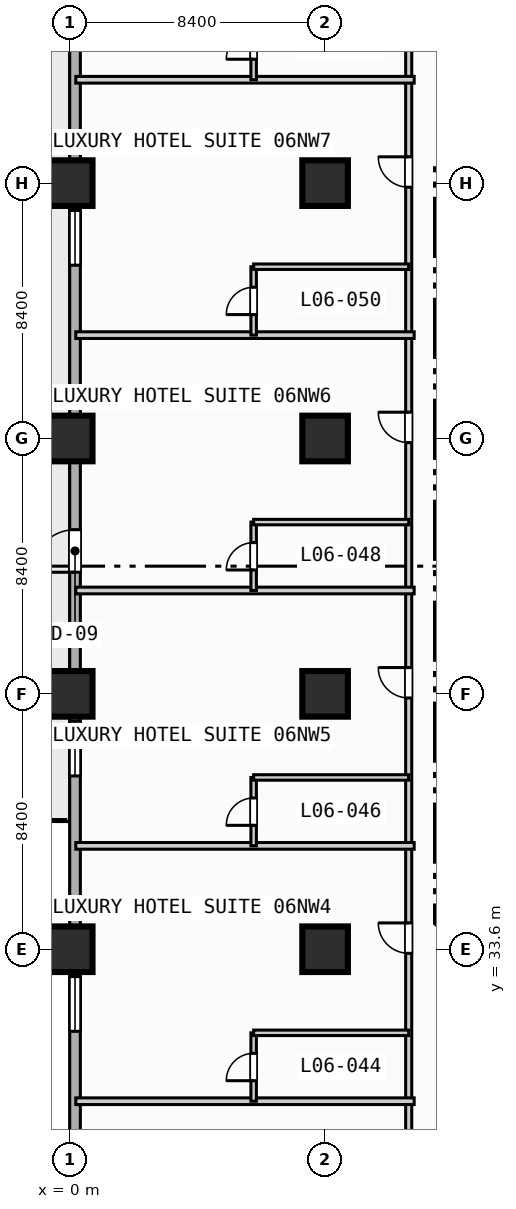
"""IFC4 building model, lengths in metres.
Left out: names, types, materials, properties, quantities, classifications, styles, units other than length and angle.
Written with IfcOpenShell. Run it as: python <this file> out.ifc"""

import sys

from ifc_helpers import new_model, si_unit, direction, frame, frame_2d, origin, origin_2d, place, context, subcontext, project, spatial, rectangle, extrude, element, fill, save


model = new_model("IFC4")
c1 = context("Model", 3, precision=1e-05, world=origin(), true_north=direction((0.0, 1.0)))
c2 = subcontext(c1, "Body", "Model", "MODEL_VIEW")
j1 = project(units=[si_unit("LENGTHUNIT", "METRE"), si_unit("PLANEANGLEUNIT", "RADIAN")], contexts=[c1])
p1 = place(None, origin())
s1 = spatial("IfcSite", under=j1, at=p1, CompositionType="ELEMENT")
p2 = place(p1, origin())
s2 = spatial("IfcBuilding", under=s1, at=p2, CompositionType="ELEMENT")
p3 = place(p2, frame((0.0, 0.0, 32.0)))
s3 = spatial("IfcBuildingStorey", under=s2, at=p3, CompositionType="ELEMENT", Elevation=32.0)
for number, where, z_axis, x_axis in (
    (1, (0.0, 33.6, 0.0), (0.0, 0.0, 1.0), (1.0, 0.0, 0.0)),
    (2, (0.0, 42.0, 0.0), (0.0, 0.0, 1.0), (1.0, 0.0, 0.0)),
    (3, (0.0, 50.4, 0.0), (0.0, 0.0, 1.0), (1.0, 0.0, 0.0)),
    (4, (0.0, 58.8, 0.0), (0.0, 0.0, 1.0), (1.0, 0.0, 0.0)),
    (5, (8.4, 33.6, 0.0), (0.0, 0.0, 1.0), (1.0, 0.0, 0.0)),
    (6, (8.4, 42.0, 0.0), (0.0, 0.0, 1.0), (1.0, 0.0, 0.0)),
    (7, (8.4, 50.4, 0.0), (0.0, 0.0, 1.0), (1.0, 0.0, 0.0)),
    (8, (8.4, 58.8, 0.0), (0.0, 0.0, 1.0), (1.0, 0.0, 0.0)),
):
    element("IfcColumn", number, at=place(p3, frame(where, z_axis=z_axis, x_axis=x_axis)), inside=s3, PredefinedType="COLUMN", context=c2, shape_type="SweptSolid", body=[
        extrude(rectangle(XDim=1.5, YDim=1.5, at=origin_2d()), origin(), (0.0, 0.0, 1.0), 3.8),
    ])
p4 = place(p3, frame((0.175, 3.175, 0.0), z_axis=(0.0, 0.0, 1.0), x_axis=(0.0, 1.0, 0.0)))
e9 = element("IfcWall", 9, at=p4, inside=s3, PredefinedType="STANDARD", context=c2, shape_type="SweptSolid", body=[
    extrude(rectangle(XDim=86.05, YDim=0.35, at=frame_2d((43.025, 0.0))), origin(), (0.0, 0.0, 1.0), 3.55),
])
p5 = place(p4, frame((42.825, 0.0, 0.0)))
e10 = element("IfcOpeningElement", 10, at=p5, cuts=e9, PredefinedType="OPENING", context=c2, shape_type="SweptSolid", body=[
    extrude(rectangle(XDim=1.4, YDim=2.2, at=frame_2d((0.7, 1.1))), frame((0.0, 0.185, 0.0), z_axis=(0.0, -1.0, 0.0), x_axis=(1.0, 0.0, 0.0)), (0.0, 0.0, 1.0), 0.37),
])
p6 = place(p4, frame((2.525, 0.0, 0.85)))
e11 = element("IfcOpeningElement", 11, at=p6, cuts=e9, PredefinedType="OPENING", context=c2, shape_type="SweptSolid", body=[
    extrude(rectangle(XDim=1.8, YDim=1.8, at=frame_2d((0.9, 0.9))), frame((0.0, 0.185, 0.0), z_axis=(0.0, -1.0, 0.0), x_axis=(1.0, 0.0, 0.0)), (0.0, 0.0, 1.0), 0.37),
])
p7 = place(p4, frame((10.925, 0.0, 0.85)))
e12 = element("IfcOpeningElement", 12, at=p7, cuts=e9, PredefinedType="OPENING", context=c2, shape_type="SweptSolid", body=[
    extrude(rectangle(XDim=1.8, YDim=1.8, at=frame_2d((0.9, 0.9))), frame((0.0, 0.185, 0.0), z_axis=(0.0, -1.0, 0.0), x_axis=(1.0, 0.0, 0.0)), (0.0, 0.0, 1.0), 0.37),
])
p8 = place(p4, frame((19.325, 0.0, 0.85)))
e13 = element("IfcOpeningElement", 13, at=p8, cuts=e9, PredefinedType="OPENING", context=c2, shape_type="SweptSolid", body=[
    extrude(rectangle(XDim=1.8, YDim=1.8, at=frame_2d((0.9, 0.9))), frame((0.0, 0.185, 0.0), z_axis=(0.0, -1.0, 0.0), x_axis=(1.0, 0.0, 0.0)), (0.0, 0.0, 1.0), 0.37),
])
p9 = place(p4, frame((27.725, 0.0, 0.85)))
e14 = element("IfcOpeningElement", 14, at=p9, cuts=e9, PredefinedType="OPENING", context=c2, shape_type="SweptSolid", body=[
    extrude(rectangle(XDim=1.8, YDim=1.8, at=frame_2d((0.9, 0.9))), frame((0.0, 0.185, 0.0), z_axis=(0.0, -1.0, 0.0), x_axis=(1.0, 0.0, 0.0)), (0.0, 0.0, 1.0), 0.37),
])
p10 = place(p4, frame((36.125, 0.0, 0.85)))
e15 = element("IfcOpeningElement", 15, at=p10, cuts=e9, PredefinedType="OPENING", context=c2, shape_type="SweptSolid", body=[
    extrude(rectangle(XDim=1.8, YDim=1.8, at=frame_2d((0.9, 0.9))), frame((0.0, 0.185, 0.0), z_axis=(0.0, -1.0, 0.0), x_axis=(1.0, 0.0, 0.0)), (0.0, 0.0, 1.0), 0.37),
])
p11 = place(p4, frame((52.925, 0.0, 0.85)))
e16 = element("IfcOpeningElement", 16, at=p11, cuts=e9, PredefinedType="OPENING", context=c2, shape_type="SweptSolid", body=[
    extrude(rectangle(XDim=1.8, YDim=1.8, at=frame_2d((0.9, 0.9))), frame((0.0, 0.185, 0.0), z_axis=(0.0, -1.0, 0.0), x_axis=(1.0, 0.0, 0.0)), (0.0, 0.0, 1.0), 0.37),
])
p12 = place(p4, frame((61.325, 0.0, 0.85)))
e17 = element("IfcOpeningElement", 17, at=p12, cuts=e9, PredefinedType="OPENING", context=c2, shape_type="SweptSolid", body=[
    extrude(rectangle(XDim=1.8, YDim=1.8, at=frame_2d((0.9, 0.9))), frame((0.0, 0.185, 0.0), z_axis=(0.0, -1.0, 0.0), x_axis=(1.0, 0.0, 0.0)), (0.0, 0.0, 1.0), 0.37),
])
p13 = place(p4, frame((69.725, 0.0, 0.85)))
e18 = element("IfcOpeningElement", 18, at=p13, cuts=e9, PredefinedType="OPENING", context=c2, shape_type="SweptSolid", body=[
    extrude(rectangle(XDim=1.8, YDim=1.8, at=frame_2d((0.9, 0.9))), frame((0.0, 0.185, 0.0), z_axis=(0.0, -1.0, 0.0), x_axis=(1.0, 0.0, 0.0)), (0.0, 0.0, 1.0), 0.37),
])
p14 = place(p4, frame((78.075, 0.0, 0.85)))
e19 = element("IfcOpeningElement", 19, at=p14, cuts=e9, PredefinedType="OPENING", context=c2, shape_type="SweptSolid", body=[
    extrude(rectangle(XDim=1.8, YDim=1.8, at=frame_2d((0.9, 0.9))), frame((0.0, 0.185, 0.0), z_axis=(0.0, -1.0, 0.0), x_axis=(1.0, 0.0, 0.0)), (0.0, 0.0, 1.0), 0.37),
])
p15 = place(p3, frame((11.15, 3.4, 0.0), z_axis=(0.0, 0.0, 1.0), x_axis=(0.0, 1.0, 0.0)))
e20 = element("IfcWall", 20, at=p15, inside=s3, PredefinedType="PARTITIONING", context=c2, shape_type="SweptSolid", body=[
    extrude(rectangle(XDim=85.4, YDim=0.2, at=frame_2d((42.7, 0.0))), origin(), (0.0, 0.0, 1.0), 3.55),
])
p16 = place(p15, frame((4.865, 0.0, 0.0)))
e21 = element("IfcOpeningElement", 21, at=p16, cuts=e20, PredefinedType="OPENING", context=c2, shape_type="SweptSolid", body=[
    extrude(rectangle(XDim=1.0, YDim=2.15, at=frame_2d((0.5, 1.075))), frame((0.0, 0.11, 0.0), z_axis=(0.0, -1.0, 0.0), x_axis=(1.0, 0.0, 0.0)), (0.0, 0.0, 1.0), 0.22),
])
p17 = place(p15, frame((13.265, 0.0, 0.0)))
e22 = element("IfcOpeningElement", 22, at=p17, cuts=e20, PredefinedType="OPENING", context=c2, shape_type="SweptSolid", body=[
    extrude(rectangle(XDim=1.0, YDim=2.15, at=frame_2d((0.5, 1.075))), frame((0.0, 0.11, 0.0), z_axis=(0.0, -1.0, 0.0), x_axis=(1.0, 0.0, 0.0)), (0.0, 0.0, 1.0), 0.22),
])
p18 = place(p15, frame((21.665, 0.0, 0.0)))
e23 = element("IfcOpeningElement", 23, at=p18, cuts=e20, PredefinedType="OPENING", context=c2, shape_type="SweptSolid", body=[
    extrude(rectangle(XDim=1.0, YDim=2.15, at=frame_2d((0.5, 1.075))), frame((0.0, 0.11, 0.0), z_axis=(0.0, -1.0, 0.0), x_axis=(1.0, 0.0, 0.0)), (0.0, 0.0, 1.0), 0.22),
])
p19 = place(p15, frame((30.065, 0.0, 0.0)))
e24 = element("IfcOpeningElement", 24, at=p19, cuts=e20, PredefinedType="OPENING", context=c2, shape_type="SweptSolid", body=[
    extrude(rectangle(XDim=1.0, YDim=2.15, at=frame_2d((0.5, 1.075))), frame((0.0, 0.11, 0.0), z_axis=(0.0, -1.0, 0.0), x_axis=(1.0, 0.0, 0.0)), (0.0, 0.0, 1.0), 0.22),
])
p20 = place(p15, frame((38.465, 0.0, 0.0)))
e25 = element("IfcOpeningElement", 25, at=p20, cuts=e20, PredefinedType="OPENING", context=c2, shape_type="SweptSolid", body=[
    extrude(rectangle(XDim=1.0, YDim=2.15, at=frame_2d((0.5, 1.075))), frame((0.0, 0.11, 0.0), z_axis=(0.0, -1.0, 0.0), x_axis=(1.0, 0.0, 0.0)), (0.0, 0.0, 1.0), 0.22),
])
p21 = place(p15, frame((46.865, 0.0, 0.0)))
e26 = element("IfcOpeningElement", 26, at=p21, cuts=e20, PredefinedType="OPENING", context=c2, shape_type="SweptSolid", body=[
    extrude(rectangle(XDim=1.0, YDim=2.15, at=frame_2d((0.5, 1.075))), frame((0.0, 0.11, 0.0), z_axis=(0.0, -1.0, 0.0), x_axis=(1.0, 0.0, 0.0)), (0.0, 0.0, 1.0), 0.22),
])
p22 = place(p15, frame((55.265, 0.0, 0.0)))
e27 = element("IfcOpeningElement", 27, at=p22, cuts=e20, PredefinedType="OPENING", context=c2, shape_type="SweptSolid", body=[
    extrude(rectangle(XDim=1.0, YDim=2.15, at=frame_2d((0.5, 1.075))), frame((0.0, 0.11, 0.0), z_axis=(0.0, -1.0, 0.0), x_axis=(1.0, 0.0, 0.0)), (0.0, 0.0, 1.0), 0.22),
])
p23 = place(p15, frame((63.665, 0.0, 0.0)))
e28 = element("IfcOpeningElement", 28, at=p23, cuts=e20, PredefinedType="OPENING", context=c2, shape_type="SweptSolid", body=[
    extrude(rectangle(XDim=1.0, YDim=2.15, at=frame_2d((0.5, 1.075))), frame((0.0, 0.11, 0.0), z_axis=(0.0, -1.0, 0.0), x_axis=(1.0, 0.0, 0.0)), (0.0, 0.0, 1.0), 0.22),
])
p24 = place(p15, frame((72.065, 0.0, 0.0)))
e29 = element("IfcOpeningElement", 29, at=p24, cuts=e20, PredefinedType="OPENING", context=c2, shape_type="SweptSolid", body=[
    extrude(rectangle(XDim=1.0, YDim=2.15, at=frame_2d((0.5, 1.075))), frame((0.0, 0.11, 0.0), z_axis=(0.0, -1.0, 0.0), x_axis=(1.0, 0.0, 0.0)), (0.0, 0.0, 1.0), 0.22),
])
p25 = place(p15, frame((81.165, 0.0, 0.0)))
e30 = element("IfcOpeningElement", 30, at=p25, cuts=e20, PredefinedType="OPENING", context=c2, shape_type="SweptSolid", body=[
    extrude(rectangle(XDim=1.0, YDim=2.15, at=frame_2d((0.5, 1.075))), frame((0.0, 0.11, 0.0), z_axis=(0.0, -1.0, 0.0), x_axis=(1.0, 0.0, 0.0)), (0.0, 0.0, 1.0), 0.22),
])
p26 = place(p3, frame((0.2, 28.6, 0.0), z_axis=(0.0, 0.0, 1.0), x_axis=(1.0, 0.0, 0.0)))
e31 = element("IfcWall", 31, at=p26, inside=s3, PredefinedType="PARTITIONING", context=c2, shape_type="SweptSolid", body=[
    extrude(rectangle(XDim=11.13, YDim=0.22, at=frame_2d((5.565, 0.0))), origin(), (0.0, 0.0, 1.0), 3.55),
])
p27 = place(p3, frame((6.05, 28.6, 0.0), z_axis=(0.0, 0.0, 1.0), x_axis=(0.0, 1.0, 0.0)))
e32 = element("IfcWall", 32, at=p27, inside=s3, PredefinedType="PLUMBINGWALL", context=c2, shape_type="SweptSolid", body=[
    extrude(rectangle(XDim=2.25, YDim=0.18, at=frame_2d((1.125, 0.0))), origin(), (0.0, 0.0, 1.0), 3.55),
])
p28 = place(p27, frame((0.675, 0.0, 0.0)))
e33 = element("IfcOpeningElement", 33, at=p28, cuts=e32, PredefinedType="OPENING", context=c2, shape_type="SweptSolid", body=[
    extrude(rectangle(XDim=0.9, YDim=2.1, at=frame_2d((0.45, 1.05))), frame((0.0, 0.1, 0.0), z_axis=(0.0, -1.0, 0.0), x_axis=(1.0, 0.0, 0.0)), (0.0, 0.0, 1.0), 0.2),
])
p29 = place(p3, frame((6.05, 30.85, 0.0), z_axis=(0.0, 0.0, 1.0), x_axis=(1.0, 0.0, 0.0)))
e34 = element("IfcWall", 34, at=p29, inside=s3, PredefinedType="PLUMBINGWALL", context=c2, shape_type="SweptSolid", body=[
    extrude(rectangle(XDim=5.1, YDim=0.18, at=frame_2d((2.55, 0.0))), origin(), (0.0, 0.0, 1.0), 3.55),
])
p30 = place(p3, frame((0.2, 37.0, 0.0), z_axis=(0.0, 0.0, 1.0), x_axis=(1.0, 0.0, 0.0)))
e35 = element("IfcWall", 35, at=p30, inside=s3, PredefinedType="PARTITIONING", context=c2, shape_type="SweptSolid", body=[
    extrude(rectangle(XDim=11.13, YDim=0.22, at=frame_2d((5.565, 0.0))), origin(), (0.0, 0.0, 1.0), 3.55),
])
p31 = place(p3, frame((6.05, 37.0, 0.0), z_axis=(0.0, 0.0, 1.0), x_axis=(0.0, 1.0, 0.0)))
e36 = element("IfcWall", 36, at=p31, inside=s3, PredefinedType="PLUMBINGWALL", context=c2, shape_type="SweptSolid", body=[
    extrude(rectangle(XDim=2.25, YDim=0.18, at=frame_2d((1.125, 0.0))), origin(), (0.0, 0.0, 1.0), 3.55),
])
p32 = place(p31, frame((0.675, 0.0, 0.0)))
e37 = element("IfcOpeningElement", 37, at=p32, cuts=e36, PredefinedType="OPENING", context=c2, shape_type="SweptSolid", body=[
    extrude(rectangle(XDim=0.9, YDim=2.1, at=frame_2d((0.45, 1.05))), frame((0.0, 0.1, 0.0), z_axis=(0.0, -1.0, 0.0), x_axis=(1.0, 0.0, 0.0)), (0.0, 0.0, 1.0), 0.2),
])
p33 = place(p3, frame((6.05, 39.25, 0.0), z_axis=(0.0, 0.0, 1.0), x_axis=(1.0, 0.0, 0.0)))
e38 = element("IfcWall", 38, at=p33, inside=s3, PredefinedType="PLUMBINGWALL", context=c2, shape_type="SweptSolid", body=[
    extrude(rectangle(XDim=5.1, YDim=0.18, at=frame_2d((2.55, 0.0))), origin(), (0.0, 0.0, 1.0), 3.55),
])
p34 = place(p3, frame((0.2, 45.4, 0.0), z_axis=(0.0, 0.0, 1.0), x_axis=(1.0, 0.0, 0.0)))
e39 = element("IfcWall", 39, at=p34, inside=s3, PredefinedType="PARTITIONING", context=c2, shape_type="SweptSolid", body=[
    extrude(rectangle(XDim=11.13, YDim=0.22, at=frame_2d((5.565, 0.0))), origin(), (0.0, 0.0, 1.0), 3.55),
])
p35 = place(p3, frame((6.05, 45.4, 0.0), z_axis=(0.0, 0.0, 1.0), x_axis=(0.0, 1.0, 0.0)))
e40 = element("IfcWall", 40, at=p35, inside=s3, PredefinedType="PLUMBINGWALL", context=c2, shape_type="SweptSolid", body=[
    extrude(rectangle(XDim=2.25, YDim=0.18, at=frame_2d((1.125, 0.0))), origin(), (0.0, 0.0, 1.0), 3.55),
])
p36 = place(p35, frame((0.675, 0.0, 0.0)))
e41 = element("IfcOpeningElement", 41, at=p36, cuts=e40, PredefinedType="OPENING", context=c2, shape_type="SweptSolid", body=[
    extrude(rectangle(XDim=0.9, YDim=2.1, at=frame_2d((0.45, 1.05))), frame((0.0, 0.1, 0.0), z_axis=(0.0, -1.0, 0.0), x_axis=(1.0, 0.0, 0.0)), (0.0, 0.0, 1.0), 0.2),
])
p37 = place(p3, frame((6.05, 47.65, 0.0), z_axis=(0.0, 0.0, 1.0), x_axis=(1.0, 0.0, 0.0)))
e42 = element("IfcWall", 42, at=p37, inside=s3, PredefinedType="PLUMBINGWALL", context=c2, shape_type="SweptSolid", body=[
    extrude(rectangle(XDim=5.1, YDim=0.18, at=frame_2d((2.55, 0.0))), origin(), (0.0, 0.0, 1.0), 3.55),
])
p38 = place(p3, frame((0.2, 53.8, 0.0), z_axis=(0.0, 0.0, 1.0), x_axis=(1.0, 0.0, 0.0)))
e43 = element("IfcWall", 43, at=p38, inside=s3, PredefinedType="PARTITIONING", context=c2, shape_type="SweptSolid", body=[
    extrude(rectangle(XDim=11.13, YDim=0.22, at=frame_2d((5.565, 0.0))), origin(), (0.0, 0.0, 1.0), 3.55),
])
p39 = place(p3, frame((6.05, 53.8, 0.0), z_axis=(0.0, 0.0, 1.0), x_axis=(0.0, 1.0, 0.0)))
e44 = element("IfcWall", 44, at=p39, inside=s3, PredefinedType="PLUMBINGWALL", context=c2, shape_type="SweptSolid", body=[
    extrude(rectangle(XDim=2.25, YDim=0.18, at=frame_2d((1.125, 0.0))), origin(), (0.0, 0.0, 1.0), 3.55),
])
p40 = place(p39, frame((0.675, 0.0, 0.0)))
e45 = element("IfcOpeningElement", 45, at=p40, cuts=e44, PredefinedType="OPENING", context=c2, shape_type="SweptSolid", body=[
    extrude(rectangle(XDim=0.9, YDim=2.1, at=frame_2d((0.45, 1.05))), frame((0.0, 0.1, 0.0), z_axis=(0.0, -1.0, 0.0), x_axis=(1.0, 0.0, 0.0)), (0.0, 0.0, 1.0), 0.2),
])
p41 = place(p3, frame((6.05, 56.05, 0.0), z_axis=(0.0, 0.0, 1.0), x_axis=(1.0, 0.0, 0.0)))
e46 = element("IfcWall", 46, at=p41, inside=s3, PredefinedType="PLUMBINGWALL", context=c2, shape_type="SweptSolid", body=[
    extrude(rectangle(XDim=5.1, YDim=0.18, at=frame_2d((2.55, 0.0))), origin(), (0.0, 0.0, 1.0), 3.55),
])
p42 = place(p3, frame((0.2, 62.2, 0.0), z_axis=(0.0, 0.0, 1.0), x_axis=(1.0, 0.0, 0.0)))
e47 = element("IfcWall", 47, at=p42, inside=s3, PredefinedType="PARTITIONING", context=c2, shape_type="SweptSolid", body=[
    extrude(rectangle(XDim=11.13, YDim=0.22, at=frame_2d((5.565, 0.0))), origin(), (0.0, 0.0, 1.0), 3.55),
])
p43 = place(p3, frame((6.05, 62.2, 0.0), z_axis=(0.0, 0.0, 1.0), x_axis=(0.0, 1.0, 0.0)))
e48 = element("IfcWall", 48, at=p43, inside=s3, PredefinedType="PLUMBINGWALL", context=c2, shape_type="SweptSolid", body=[
    extrude(rectangle(XDim=2.25, YDim=0.18, at=frame_2d((1.125, 0.0))), origin(), (0.0, 0.0, 1.0), 3.55),
])
p44 = place(p43, frame((0.675, 0.0, 0.0)))
e49 = element("IfcOpeningElement", 49, at=p44, cuts=e48, PredefinedType="OPENING", context=c2, shape_type="SweptSolid", body=[
    extrude(rectangle(XDim=0.9, YDim=2.1, at=frame_2d((0.45, 1.05))), frame((0.0, 0.1, 0.0), z_axis=(0.0, -1.0, 0.0), x_axis=(1.0, 0.0, 0.0)), (0.0, 0.0, 1.0), 0.2),
])
p45 = place(p5, origin())
e50 = element("IfcDoor", 50, at=p45, inside=s3, OperationType="SINGLE_SWING_LEFT", PredefinedType="DOOR", context=c2, shape_type="SweptSolid", body=[
    extrude(rectangle(XDim=1.4, YDim=2.2, at=frame_2d((0.7, 1.1))), frame((0.0, 0.025, 0.0), z_axis=(0.0, -1.0, 0.0), x_axis=(1.0, 0.0, 0.0)), (0.0, 0.0, 1.0), 0.05),
])
fill(e10, e50)
p46 = place(p9, origin())
e51 = element("IfcWindow", 51, at=p46, inside=s3, PartitioningType="SINGLE_PANEL", PredefinedType="WINDOW", context=c2, shape_type="SweptSolid", body=[
    extrude(rectangle(XDim=1.8, YDim=1.8, at=frame_2d((0.9, 0.9))), frame((0.0, 0.03, 0.0), z_axis=(0.0, -1.0, 0.0), x_axis=(1.0, 0.0, 0.0)), (0.0, 0.0, 1.0), 0.06),
])
fill(e14, e51)
p47 = place(p10, origin())
e52 = element("IfcWindow", 52, at=p47, inside=s3, PartitioningType="SINGLE_PANEL", PredefinedType="WINDOW", context=c2, shape_type="SweptSolid", body=[
    extrude(rectangle(XDim=1.8, YDim=1.8, at=frame_2d((0.9, 0.9))), frame((0.0, 0.03, 0.0), z_axis=(0.0, -1.0, 0.0), x_axis=(1.0, 0.0, 0.0)), (0.0, 0.0, 1.0), 0.06),
])
fill(e15, e52)
p48 = place(p11, origin())
e53 = element("IfcWindow", 53, at=p48, inside=s3, PartitioningType="SINGLE_PANEL", PredefinedType="WINDOW", context=c2, shape_type="SweptSolid", body=[
    extrude(rectangle(XDim=1.8, YDim=1.8, at=frame_2d((0.9, 0.9))), frame((0.0, 0.03, 0.0), z_axis=(0.0, -1.0, 0.0), x_axis=(1.0, 0.0, 0.0)), (0.0, 0.0, 1.0), 0.06),
])
fill(e16, e53)
p49 = place(p19, origin())
e54 = element("IfcDoor", 54, at=p49, inside=s3, OperationType="SINGLE_SWING_RIGHT", PredefinedType="DOOR", context=c2, shape_type="SweptSolid", body=[
    extrude(rectangle(XDim=1.0, YDim=2.15, at=frame_2d((0.5, 1.075))), frame((0.0, 0.025, 0.0), z_axis=(0.0, -1.0, 0.0), x_axis=(1.0, 0.0, 0.0)), (0.0, 0.0, 1.0), 0.05),
])
fill(e24, e54)
p50 = place(p20, origin())
e55 = element("IfcDoor", 55, at=p50, inside=s3, OperationType="SINGLE_SWING_RIGHT", PredefinedType="DOOR", context=c2, shape_type="SweptSolid", body=[
    extrude(rectangle(XDim=1.0, YDim=2.15, at=frame_2d((0.5, 1.075))), frame((0.0, 0.025, 0.0), z_axis=(0.0, -1.0, 0.0), x_axis=(1.0, 0.0, 0.0)), (0.0, 0.0, 1.0), 0.05),
])
fill(e25, e55)
p51 = place(p21, origin())
e56 = element("IfcDoor", 56, at=p51, inside=s3, OperationType="SINGLE_SWING_RIGHT", PredefinedType="DOOR", context=c2, shape_type="SweptSolid", body=[
    extrude(rectangle(XDim=1.0, YDim=2.15, at=frame_2d((0.5, 1.075))), frame((0.0, 0.025, 0.0), z_axis=(0.0, -1.0, 0.0), x_axis=(1.0, 0.0, 0.0)), (0.0, 0.0, 1.0), 0.05),
])
fill(e26, e56)
p52 = place(p22, origin())
e57 = element("IfcDoor", 57, at=p52, inside=s3, OperationType="SINGLE_SWING_RIGHT", PredefinedType="DOOR", context=c2, shape_type="SweptSolid", body=[
    extrude(rectangle(XDim=1.0, YDim=2.15, at=frame_2d((0.5, 1.075))), frame((0.0, 0.025, 0.0), z_axis=(0.0, -1.0, 0.0), x_axis=(1.0, 0.0, 0.0)), (0.0, 0.0, 1.0), 0.05),
])
fill(e27, e57)
p53 = place(p28, origin())
e58 = element("IfcDoor", 58, at=p53, inside=s3, OperationType="SINGLE_SWING_LEFT", PredefinedType="DOOR", context=c2, shape_type="SweptSolid", body=[
    extrude(rectangle(XDim=0.9, YDim=2.1, at=frame_2d((0.45, 1.05))), frame((0.0, 0.025, 0.0), z_axis=(0.0, -1.0, 0.0), x_axis=(1.0, 0.0, 0.0)), (0.0, 0.0, 1.0), 0.05),
])
fill(e33, e58)
p54 = place(p32, origin())
e59 = element("IfcDoor", 59, at=p54, inside=s3, OperationType="SINGLE_SWING_LEFT", PredefinedType="DOOR", context=c2, shape_type="SweptSolid", body=[
    extrude(rectangle(XDim=0.9, YDim=2.1, at=frame_2d((0.45, 1.05))), frame((0.0, 0.025, 0.0), z_axis=(0.0, -1.0, 0.0), x_axis=(1.0, 0.0, 0.0)), (0.0, 0.0, 1.0), 0.05),
])
fill(e37, e59)
p55 = place(p36, origin())
e60 = element("IfcDoor", 60, at=p55, inside=s3, OperationType="SINGLE_SWING_LEFT", PredefinedType="DOOR", context=c2, shape_type="SweptSolid", body=[
    extrude(rectangle(XDim=0.9, YDim=2.1, at=frame_2d((0.45, 1.05))), frame((0.0, 0.025, 0.0), z_axis=(0.0, -1.0, 0.0), x_axis=(1.0, 0.0, 0.0)), (0.0, 0.0, 1.0), 0.05),
])
fill(e41, e60)
p56 = place(p40, origin())
e61 = element("IfcDoor", 61, at=p56, inside=s3, OperationType="SINGLE_SWING_LEFT", PredefinedType="DOOR", context=c2, shape_type="SweptSolid", body=[
    extrude(rectangle(XDim=0.9, YDim=2.1, at=frame_2d((0.45, 1.05))), frame((0.0, 0.025, 0.0), z_axis=(0.0, -1.0, 0.0), x_axis=(1.0, 0.0, 0.0)), (0.0, 0.0, 1.0), 0.05),
])
fill(e45, e61)
p57 = place(p44, origin())
e62 = element("IfcDoor", 62, at=p57, inside=s3, OperationType="SINGLE_SWING_LEFT", PredefinedType="DOOR", context=c2, shape_type="SweptSolid", body=[
    extrude(rectangle(XDim=0.9, YDim=2.1, at=frame_2d((0.45, 1.05))), frame((0.0, 0.025, 0.0), z_axis=(0.0, -1.0, 0.0), x_axis=(1.0, 0.0, 0.0)), (0.0, 0.0, 1.0), 0.05),
])
fill(e49, e62)
save(model, sys.argv[1])
